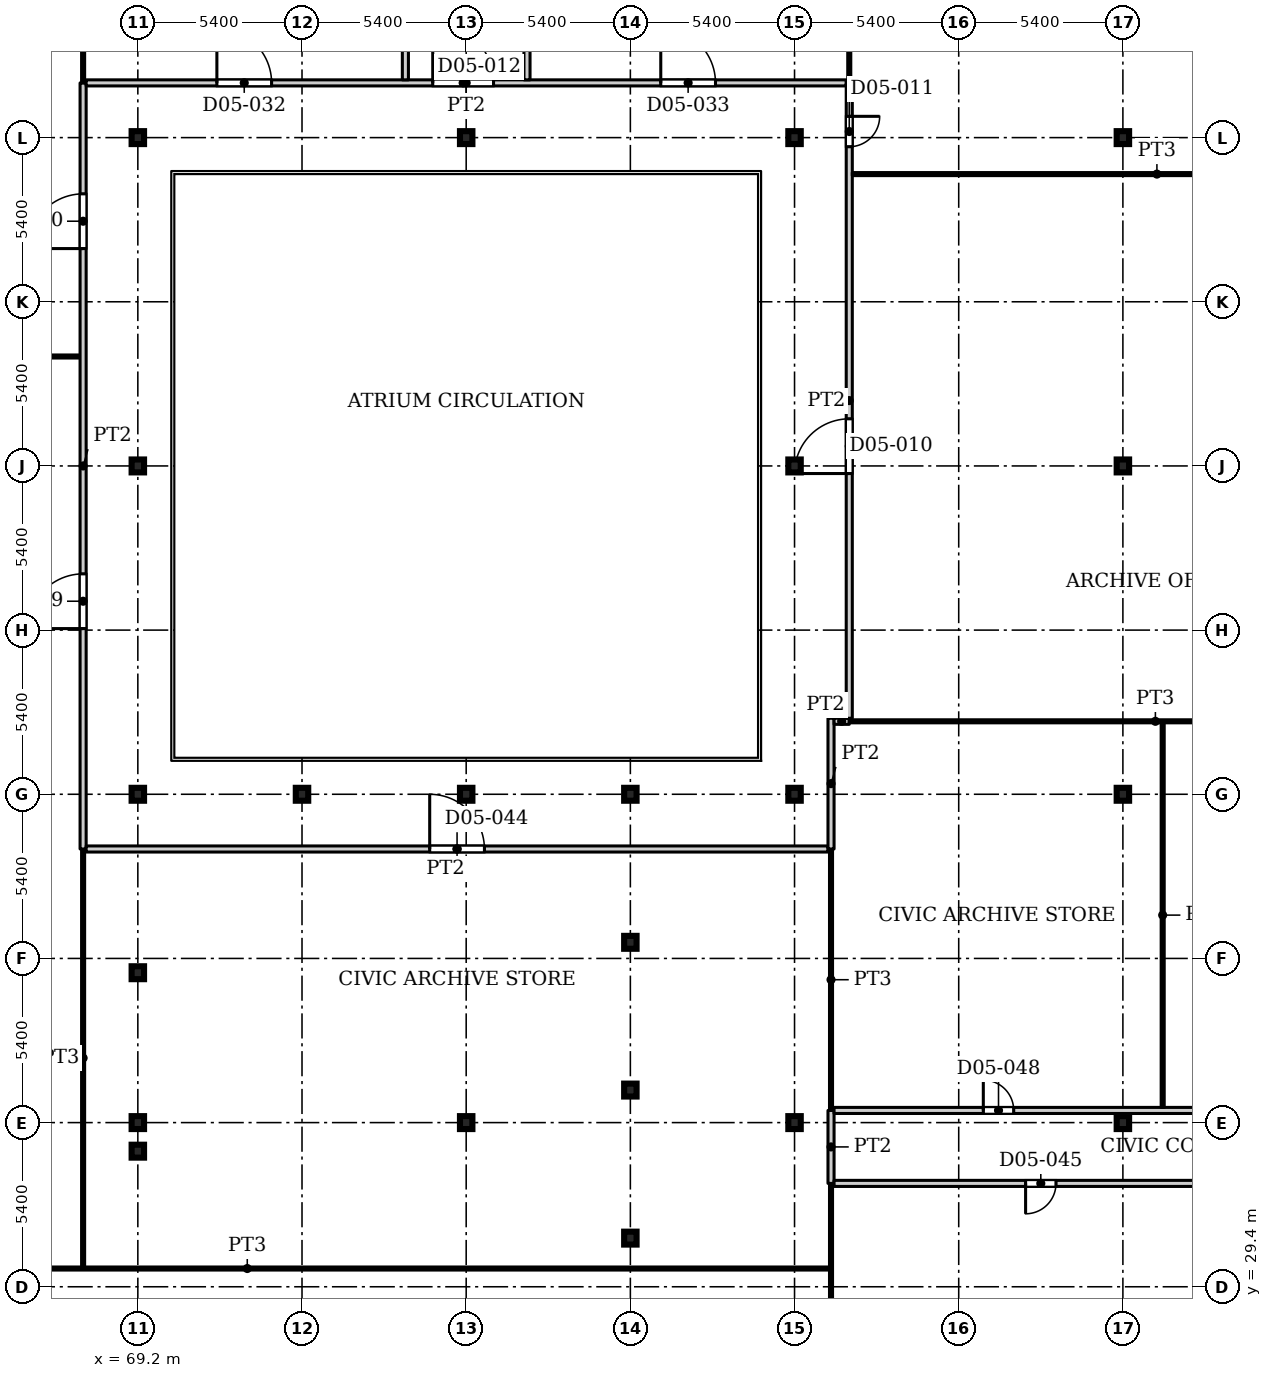
"""IFC4 building model, lengths in metres.
Left out: names, types, materials, properties, quantities, classifications, styles, units other than length and angle.
Written with IfcOpenShell. Run it as: python <this file> out.ifc"""

import sys

from ifc_helpers import new_model, si_unit, direction, frame, frame_2d, origin, origin_2d, place, context, subcontext, project, spatial, rectangle, i_section, extrude, source, transform, mapped, element, fill, save


model = new_model("IFC4")
c1 = context("Model", 3, precision=1e-05, world=origin(), true_north=direction((0.0, 1.0)))
c2 = subcontext(c1, "Body", "Model", "MODEL_VIEW")
j1 = project(units=[si_unit("LENGTHUNIT", "METRE"), si_unit("PLANEANGLEUNIT", "RADIAN")], contexts=[c1])
p1 = place(None, origin())
s1 = spatial("IfcSite", under=j1, at=p1, CompositionType="ELEMENT")
p2 = place(p1, origin())
s2 = spatial("IfcBuilding", under=s1, at=p2, CompositionType="ELEMENT")
p3 = place(p2, frame((0.0, 0.0, 26.0)))
s3 = spatial("IfcBuildingStorey", under=s2, at=p3, CompositionType="ELEMENT", Elevation=26.0)
for number, where, z_axis, x_axis in (
    (1, (69.2, 34.8, 0.0), (0.0, 0.0, 1.0), (1.0, 0.0, 0.0)),
    (2, (80.0, 34.8, 0.0), (0.0, 0.0, 1.0), (1.0, 0.0, 0.0)),
    (3, (90.8, 34.8, 0.0), (0.0, 0.0, 1.0), (1.0, 0.0, 0.0)),
    (4, (101.6, 34.8, 0.0), (0.0, 0.0, 1.0), (1.0, 0.0, 0.0)),
    (5, (69.2, 45.6, 0.0), (0.0, 0.0, 1.0), (1.0, 0.0, 0.0)),
    (6, (80.0, 45.6, 0.0), (0.0, 0.0, 1.0), (1.0, 0.0, 0.0)),
    (7, (90.8, 45.6, 0.0), (0.0, 0.0, 1.0), (1.0, 0.0, 0.0)),
    (8, (101.6, 45.6, 0.0), (0.0, 0.0, 1.0), (1.0, 0.0, 0.0)),
    (9, (69.2, 56.4, 0.0), (0.0, 0.0, 1.0), (1.0, 0.0, 0.0)),
    (10, (90.8, 56.4, 0.0), (0.0, 0.0, 1.0), (1.0, 0.0, 0.0)),
    (11, (101.6, 56.4, 0.0), (0.0, 0.0, 1.0), (1.0, 0.0, 0.0)),
    (12, (69.2, 67.2, 0.0), (0.0, 0.0, 1.0), (1.0, 0.0, 0.0)),
    (13, (80.0, 67.2, 0.0), (0.0, 0.0, 1.0), (1.0, 0.0, 0.0)),
    (14, (90.8, 67.2, 0.0), (0.0, 0.0, 1.0), (1.0, 0.0, 0.0)),
    (15, (101.6, 67.2, 0.0), (0.0, 0.0, 1.0), (1.0, 0.0, 0.0)),
    (16, (74.6, 45.6, 0.0), (0.0, 0.0, 1.0), (1.0, 0.0, 0.0)),
    (17, (85.4, 45.6, 0.0), (0.0, 0.0, 1.0), (1.0, 0.0, 0.0)),
    (18, (85.4, 31.0, 0.0), (0.0, 0.0, 1.0), (1.0, 0.0, 0.0)),
    (19, (69.2, 33.86, 0.0), (0.0, 0.0, 1.0), (1.0, 0.0, 0.0)),
    (20, (85.4, 35.87, 0.0), (0.0, 0.0, 1.0), (1.0, 0.0, 0.0)),
    (21, (69.2, 39.73, 0.0), (0.0, 0.0, 1.0), (1.0, 0.0, 0.0)),
    (22, (85.4, 40.73, 0.0), (0.0, 0.0, 1.0), (1.0, 0.0, 0.0)),
):
    element("IfcColumn", number, at=place(p3, frame(where, z_axis=z_axis, x_axis=x_axis)), inside=s3, PredefinedType="COLUMN", context=c2, shape_type="SweptSolid", body=[
        extrude(i_section(OverallWidth=0.409, OverallDepth=0.425, WebThickness=0.033, FlangeThickness=0.052, FilletRadius=0.013, at=origin_2d()), origin(), (0.0, 0.0, 1.0), 4.5),
    ])
p4 = place(p3, frame((33.45, 60.0, 0.0), z_axis=(0.0, 0.0, 1.0), x_axis=(1.0, 0.0, 0.0)))
e23 = element("IfcWall", 23, at=p4, inside=s3, PredefinedType="PARTITIONING", context=c2, shape_type="SweptSolid", body=[
    extrude(rectangle(XDim=33.85, YDim=0.1, at=frame_2d((16.925, 0.0))), origin(), (0.0, 0.0, 1.0), 4.2),
])
p5 = place(p3, frame((53.649, 30.0, 0.0), z_axis=(0.0, 0.0, 1.0), x_axis=(1.0, 0.0, 0.0)))
e24 = element("IfcWall", 24, at=p5, inside=s3, PredefinedType="PARTITIONING", context=c2, shape_type="SweptSolid", body=[
    extrude(rectangle(XDim=38.301, YDim=0.1, at=frame_2d((19.15, 0.0))), origin(), (0.0, 0.0, 1.0), 4.2),
])
p6 = place(p3, frame((67.4, 30.05, 0.0), z_axis=(0.0, 0.0, 1.0), x_axis=(0.0, 1.0, 0.0)))
e25 = element("IfcWall", 25, at=p6, inside=s3, PredefinedType="PARTITIONING", context=c2, shape_type="SweptSolid", body=[
    extrude(rectangle(XDim=13.75, YDim=0.1, at=frame_2d((6.875, 0.0))), origin(), (0.0, 0.0, 1.0), 4.2),
])
p7 = place(p3, frame((67.4, 43.8, 0.0), z_axis=(0.0, 0.0, 1.0), x_axis=(0.0, 1.0, 0.0)))
e26 = element("IfcWall", 26, at=p7, inside=s3, PredefinedType="PARTITIONING", context=c2, shape_type="SweptSolid", body=[
    extrude(rectangle(XDim=25.2, YDim=0.2, at=frame_2d((12.6, 0.0))), origin(), (0.0, 0.0, 1.0), 4.2),
])
p8 = place(p7, frame((7.25, 0.0, 0.0)))
e27 = element("IfcOpeningElement", 27, at=p8, cuts=e26, PredefinedType="OPENING", context=c2, shape_type="SweptSolid", body=[
    extrude(rectangle(XDim=1.8, YDim=2.1, at=frame_2d((0.9, 1.05))), frame((0.0, 0.11, 0.0), z_axis=(0.0, -1.0, 0.0), x_axis=(1.0, 0.0, 0.0)), (0.0, 0.0, 1.0), 0.22),
])
p9 = place(p7, frame((19.75, 0.0, 0.0)))
e28 = element("IfcOpeningElement", 28, at=p9, cuts=e26, PredefinedType="OPENING", context=c2, shape_type="SweptSolid", body=[
    extrude(rectangle(XDim=1.8, YDim=2.1, at=frame_2d((0.9, 1.05))), frame((0.0, 0.11, 0.0), z_axis=(0.0, -1.0, 0.0), x_axis=(1.0, 0.0, 0.0)), (0.0, 0.0, 1.0), 0.22),
])
p10 = place(p3, frame((67.4, 69.0, 0.0), z_axis=(0.0, 0.0, 1.0), x_axis=(0.0, 1.0, 0.0)))
e29 = element("IfcWall", 29, at=p10, inside=s3, PredefinedType="PARTITIONING", context=c2, shape_type="SweptSolid", body=[
    extrude(rectangle(XDim=21.738, YDim=0.1, at=frame_2d((10.869, 0.0))), origin(), (0.0, 0.0, 1.0), 4.2),
])
p11 = place(p3, frame((67.5, 43.8, 0.0), z_axis=(0.0, 0.0, 1.0), x_axis=(1.0, 0.0, 0.0)))
e30 = element("IfcWall", 30, at=p11, inside=s3, PredefinedType="PARTITIONING", context=c2, shape_type="SweptSolid", body=[
    extrude(rectangle(XDim=24.4, YDim=0.2, at=frame_2d((12.2, 0.0))), origin(), (0.0, 0.0, 1.0), 4.2),
])
p12 = place(p11, frame((11.3, 0.0, 0.0)))
e31 = element("IfcOpeningElement", 31, at=p12, cuts=e30, PredefinedType="OPENING", context=c2, shape_type="SweptSolid", body=[
    extrude(rectangle(XDim=1.8, YDim=2.1, at=frame_2d((0.9, 1.05))), frame((0.0, 0.11, 0.0), z_axis=(0.0, -1.0, 0.0), x_axis=(1.0, 0.0, 0.0)), (0.0, 0.0, 1.0), 0.22),
])
p13 = place(p3, frame((67.5, 69.0, 0.0), z_axis=(0.0, 0.0, 1.0), x_axis=(1.0, 0.0, 0.0)))
e32 = element("IfcWall", 32, at=p13, inside=s3, PredefinedType="PARTITIONING", context=c2, shape_type="SweptSolid", body=[
    extrude(rectangle(XDim=25.0, YDim=0.2, at=frame_2d((12.5, 0.0))), origin(), (0.0, 0.0, 1.0), 4.2),
])
p14 = place(p13, frame((11.4, 0.0, 0.0)))
e33 = element("IfcOpeningElement", 33, at=p14, cuts=e32, PredefinedType="OPENING", context=c2, shape_type="SweptSolid", body=[
    extrude(rectangle(XDim=2.0, YDim=2.1, at=frame_2d((1.0, 1.05))), frame((0.0, 0.11, 0.0), z_axis=(0.0, -1.0, 0.0), x_axis=(1.0, 0.0, 0.0)), (0.0, 0.0, 1.0), 0.22),
])
p15 = place(p13, frame((4.3, 0.0, 0.0)))
e34 = element("IfcOpeningElement", 34, at=p15, cuts=e32, PredefinedType="OPENING", context=c2, shape_type="SweptSolid", body=[
    extrude(rectangle(XDim=1.8, YDim=2.1, at=frame_2d((0.9, 1.05))), frame((0.0, 0.11, 0.0), z_axis=(0.0, -1.0, 0.0), x_axis=(1.0, 0.0, 0.0)), (0.0, 0.0, 1.0), 0.22),
])
p16 = place(p13, frame((18.9, 0.0, 0.0)))
e35 = element("IfcOpeningElement", 35, at=p16, cuts=e32, PredefinedType="OPENING", context=c2, shape_type="SweptSolid", body=[
    extrude(rectangle(XDim=1.8, YDim=2.1, at=frame_2d((0.9, 1.05))), frame((0.0, 0.11, 0.0), z_axis=(0.0, -1.0, 0.0), x_axis=(1.0, 0.0, 0.0)), (0.0, 0.0, 1.0), 0.22),
])
for number, where, z_axis, x_axis in (
    (36, (78.0, 69.1, 0.0), (0.0, 0.0, 1.0), (0.0, 1.0, 0.0)),
    (37, (82.0, 69.1, 0.0), (0.0, 0.0, 1.0), (0.0, 1.0, 0.0)),
):
    element("IfcWall", number, at=place(p3, frame(where, z_axis=z_axis, x_axis=x_axis)), inside=s3, PredefinedType="PARTITIONING", context=c2, shape_type="SweptSolid", body=[
        extrude(rectangle(XDim=21.6, YDim=0.2, at=frame_2d((10.8, 0.0))), origin(), (0.0, 0.0, 1.0), 4.2),
    ])
p17 = place(p3, frame((92.0, 22.05, 0.0), z_axis=(0.0, 0.0, 1.0), x_axis=(0.0, 1.0, 0.0)))
e38 = element("IfcWall", 38, at=p17, inside=s3, PredefinedType="PARTITIONING", context=c2, shape_type="SweptSolid", body=[
    extrude(rectangle(XDim=10.75, YDim=0.1, at=frame_2d((5.375, 0.0))), origin(), (0.0, 0.0, 1.0), 4.2),
])
p18 = place(p3, frame((92.0, 32.8, 0.0), z_axis=(0.0, 0.0, 1.0), x_axis=(0.0, 1.0, 0.0)))
e39 = element("IfcWall", 39, at=p18, inside=s3, PredefinedType="PARTITIONING", context=c2, shape_type="SweptSolid", body=[
    extrude(rectangle(XDim=2.4, YDim=0.2, at=frame_2d((1.2, 0.0))), origin(), (0.0, 0.0, 1.0), 4.2),
])
p19 = place(p3, frame((92.0, 35.2, 0.0), z_axis=(0.0, 0.0, 1.0), x_axis=(0.0, 1.0, 0.0)))
e40 = element("IfcWall", 40, at=p19, inside=s3, PredefinedType="PARTITIONING", context=c2, shape_type="SweptSolid", body=[
    extrude(rectangle(XDim=8.6, YDim=0.1, at=frame_2d((4.3, 0.0))), origin(), (0.0, 0.0, 1.0), 4.2),
])
p20 = place(p3, frame((92.0, 43.8, 0.0), z_axis=(0.0, 0.0, 1.0), x_axis=(0.0, 1.0, 0.0)))
e41 = element("IfcWall", 41, at=p20, inside=s3, PredefinedType="PARTITIONING", context=c2, shape_type="SweptSolid", body=[
    extrude(rectangle(XDim=4.3, YDim=0.2, at=frame_2d((2.15, 0.0))), origin(), (0.0, 0.0, 1.0), 4.2),
])
p21 = place(p3, frame((92.1, 32.8, 0.0), z_axis=(0.0, 0.0, 1.0), x_axis=(1.0, 0.0, 0.0)))
e42 = element("IfcWall", 42, at=p21, inside=s3, PredefinedType="PARTITIONING", context=c2, shape_type="SweptSolid", body=[
    extrude(rectangle(XDim=32.881, YDim=0.2, at=frame_2d((16.44, 0.0))), origin(), (0.0, 0.0, 1.0), 4.2),
])
p22 = place(p21, frame((6.3, 0.0, 0.0)))
e43 = element("IfcOpeningElement", 43, at=p22, cuts=e42, PredefinedType="OPENING", context=c2, shape_type="SweptSolid", body=[
    extrude(rectangle(XDim=1.0, YDim=2.1, at=frame_2d((0.5, 1.05))), frame((0.0, 0.11, 0.0), z_axis=(0.0, -1.0, 0.0), x_axis=(1.0, 0.0, 0.0)), (0.0, 0.0, 1.0), 0.22),
])
p23 = place(p21, frame((19.3, 0.0, 0.0)))
e44 = element("IfcOpeningElement", 44, at=p23, cuts=e42, PredefinedType="OPENING", context=c2, shape_type="SweptSolid", body=[
    extrude(rectangle(XDim=1.0, YDim=2.1, at=frame_2d((0.5, 1.05))), frame((0.0, 0.11, 0.0), z_axis=(0.0, -1.0, 0.0), x_axis=(1.0, 0.0, 0.0)), (0.0, 0.0, 1.0), 0.22),
])
p24 = place(p21, frame((29.05, 0.0, 0.0)))
e45 = element("IfcOpeningElement", 45, at=p24, cuts=e42, PredefinedType="OPENING", context=c2, shape_type="SweptSolid", body=[
    extrude(rectangle(XDim=1.0, YDim=2.1, at=frame_2d((0.5, 1.05))), frame((0.0, 0.11, 0.0), z_axis=(0.0, -1.0, 0.0), x_axis=(1.0, 0.0, 0.0)), (0.0, 0.0, 1.0), 0.22),
])
p25 = place(p3, frame((92.1, 35.2, 0.0), z_axis=(0.0, 0.0, 1.0), x_axis=(1.0, 0.0, 0.0)))
e46 = element("IfcWall", 46, at=p25, inside=s3, PredefinedType="PARTITIONING", context=c2, shape_type="SweptSolid", body=[
    extrude(rectangle(XDim=32.88, YDim=0.2, at=frame_2d((16.44, 0.0))), origin(), (0.0, 0.0, 1.0), 4.2),
])
p26 = place(p25, frame((4.909, 0.0, 0.0)))
e47 = element("IfcOpeningElement", 47, at=p26, cuts=e46, PredefinedType="OPENING", context=c2, shape_type="SweptSolid", body=[
    extrude(rectangle(XDim=1.0, YDim=2.1, at=frame_2d((0.5, 1.05))), frame((0.0, 0.11, 0.0), z_axis=(0.0, -1.0, 0.0), x_axis=(1.0, 0.0, 0.0)), (0.0, 0.0, 1.0), 0.22),
])
p27 = place(p25, frame((13.932, 0.0, 0.0)))
e48 = element("IfcOpeningElement", 48, at=p27, cuts=e46, PredefinedType="OPENING", context=c2, shape_type="SweptSolid", body=[
    extrude(rectangle(XDim=1.0, YDim=2.1, at=frame_2d((0.5, 1.05))), frame((0.0, 0.11, 0.0), z_axis=(0.0, -1.0, 0.0), x_axis=(1.0, 0.0, 0.0)), (0.0, 0.0, 1.0), 0.22),
])
p28 = place(p25, frame((23.091, 0.0, 0.0)))
e49 = element("IfcOpeningElement", 49, at=p28, cuts=e46, PredefinedType="OPENING", context=c2, shape_type="SweptSolid", body=[
    extrude(rectangle(XDim=1.0, YDim=2.1, at=frame_2d((0.5, 1.05))), frame((0.0, 0.11, 0.0), z_axis=(0.0, -1.0, 0.0), x_axis=(1.0, 0.0, 0.0)), (0.0, 0.0, 1.0), 0.22),
])
p29 = place(p25, frame((29.477, 0.0, 0.0)))
e50 = element("IfcOpeningElement", 50, at=p29, cuts=e46, PredefinedType="OPENING", context=c2, shape_type="SweptSolid", body=[
    extrude(rectangle(XDim=1.0, YDim=2.1, at=frame_2d((0.5, 1.05))), frame((0.0, 0.11, 0.0), z_axis=(0.0, -1.0, 0.0), x_axis=(1.0, 0.0, 0.0)), (0.0, 0.0, 1.0), 0.22),
])
p30 = place(p3, frame((92.1, 48.0, 0.0), z_axis=(0.0, 0.0, 1.0), x_axis=(1.0, 0.0, 0.0)))
e51 = element("IfcWall", 51, at=p30, inside=s3, PredefinedType="PARTITIONING", context=c2, shape_type="SweptSolid", body=[
    extrude(rectangle(XDim=0.5, YDim=0.2, at=frame_2d((0.25, 0.0))), origin(), (0.0, 0.0, 1.0), 4.2),
])
p31 = place(p3, frame((92.6, 48.0, 0.0), z_axis=(0.0, 0.0, 1.0), x_axis=(1.0, 0.0, 0.0)))
e52 = element("IfcWall", 52, at=p31, inside=s3, PredefinedType="PARTITIONING", context=c2, shape_type="SweptSolid", body=[
    extrude(rectangle(XDim=20.138, YDim=0.1, at=frame_2d((10.069, 0.0))), origin(), (0.0, 0.0, 1.0), 4.2),
])
p32 = place(p3, frame((92.6, 48.1, 0.0), z_axis=(0.0, 0.0, 1.0), x_axis=(0.0, 1.0, 0.0)))
e53 = element("IfcWall", 53, at=p32, inside=s3, PredefinedType="PARTITIONING", context=c2, shape_type="SweptSolid", body=[
    extrude(rectangle(XDim=20.9, YDim=0.2, at=frame_2d((10.45, 0.0))), origin(), (0.0, 0.0, 1.0), 4.2),
])
p33 = place(p32, frame((8.05, 0.0, 0.0)))
e54 = element("IfcOpeningElement", 54, at=p33, cuts=e53, PredefinedType="OPENING", context=c2, shape_type="SweptSolid", body=[
    extrude(rectangle(XDim=1.8, YDim=2.1, at=frame_2d((0.9, 1.05))), frame((0.0, 0.11, 0.0), z_axis=(0.0, -1.0, 0.0), x_axis=(1.0, 0.0, 0.0)), (0.0, 0.0, 1.0), 0.22),
])
p34 = place(p32, frame((18.8, 0.0, 0.0)))
e55 = element("IfcOpeningElement", 55, at=p34, cuts=e53, PredefinedType="OPENING", context=c2, shape_type="SweptSolid", body=[
    extrude(rectangle(XDim=1.0, YDim=2.1, at=frame_2d((0.5, 1.05))), frame((0.0, 0.11, 0.0), z_axis=(0.0, -1.0, 0.0), x_axis=(1.0, 0.0, 0.0)), (0.0, 0.0, 1.0), 0.22),
])
p35 = place(p3, frame((92.6, 69.0, 0.0), z_axis=(0.0, 0.0, 1.0), x_axis=(0.0, 1.0, 0.0)))
e56 = element("IfcWall", 56, at=p35, inside=s3, PredefinedType="PARTITIONING", context=c2, shape_type="SweptSolid", body=[
    extrude(rectangle(XDim=21.738, YDim=0.1, at=frame_2d((10.869, 0.0))), origin(), (0.0, 0.0, 1.0), 4.2),
])
p36 = place(p3, frame((92.7, 66.0, 0.0), z_axis=(0.0, 0.0, 1.0), x_axis=(1.0, 0.0, 0.0)))
e57 = element("IfcWall", 57, at=p36, inside=s3, PredefinedType="PARTITIONING", context=c2, shape_type="SweptSolid", body=[
    extrude(rectangle(XDim=20.038, YDim=0.1, at=frame_2d((10.019, 0.0))), origin(), (0.0, 0.0, 1.0), 4.2),
])
p37 = place(p3, frame((102.909, 35.3, 0.0), z_axis=(0.0, 0.0, 1.0), x_axis=(0.0, 1.0, 0.0)))
e58 = element("IfcWall", 58, at=p37, inside=s3, PredefinedType="PARTITIONING", context=c2, shape_type="SweptSolid", body=[
    extrude(rectangle(XDim=12.65, YDim=0.1, at=frame_2d((6.325, 0.0))), origin(), (0.0, 0.0, 1.0), 4.2),
])
m1 = source(origin(), c2, "Body", "SweptSolid", [
    extrude(rectangle(XDim=1.8, YDim=2.1, at=frame_2d((0.9, 1.05))), frame((0.0, 0.025, 0.0), z_axis=(0.0, -1.0, 0.0), x_axis=(1.0, 0.0, 0.0)), (0.0, 0.0, 1.0), 0.05),
])
p38 = place(p33, origin())
e59 = element("IfcDoor", 59, at=p38, inside=s3, OperationType="DOUBLE_DOOR_SINGLE_SWING", PredefinedType="DOOR", context=c2, shape_type="MappedRepresentation", body=[
    mapped(m1, transform((0.0, 0.0, 0.0), x_axis=(1.0, 0.0, 0.0), y_axis=(0.0, 1.0, 0.0), z_axis=(0.0, 0.0, 1.0), scale=1.0)),
])
fill(e54, e59)
m2 = source(origin(), c2, "Body", "SweptSolid", [
    extrude(rectangle(XDim=1.0, YDim=2.1, at=frame_2d((0.5, 1.05))), frame((0.0, 0.025, 0.0), z_axis=(0.0, -1.0, 0.0), x_axis=(1.0, 0.0, 0.0)), (0.0, 0.0, 1.0), 0.05),
])
p39 = place(p34, origin())
e60 = element("IfcDoor", 60, at=p39, inside=s3, OperationType="SINGLE_SWING_RIGHT", PredefinedType="DOOR", context=c2, shape_type="MappedRepresentation", body=[
    mapped(m2, transform((0.0, 0.0, 0.0), x_axis=(1.0, 0.0, 0.0), y_axis=(0.0, 1.0, 0.0), z_axis=(0.0, 0.0, 1.0), scale=1.0)),
])
fill(e55, e60)
m3 = source(origin(), c2, "Body", "SweptSolid", [
    extrude(rectangle(XDim=2.0, YDim=2.1, at=frame_2d((1.0, 1.05))), frame((0.0, 0.025, 0.0), z_axis=(0.0, -1.0, 0.0), x_axis=(1.0, 0.0, 0.0)), (0.0, 0.0, 1.0), 0.05),
])
p40 = place(p14, origin())
e61 = element("IfcDoor", 61, at=p40, inside=s3, OperationType="DOUBLE_DOOR_SINGLE_SWING", PredefinedType="DOOR", context=c2, shape_type="MappedRepresentation", body=[
    mapped(m3, transform((0.0, 0.0, 0.0), x_axis=(1.0, 0.0, 0.0), y_axis=(0.0, 1.0, 0.0), z_axis=(0.0, 0.0, 1.0), scale=1.0)),
])
fill(e33, e61)
p41 = place(p15, origin())
e62 = element("IfcDoor", 62, at=p41, inside=s3, OperationType="DOUBLE_DOOR_SINGLE_SWING", PredefinedType="DOOR", context=c2, shape_type="MappedRepresentation", body=[
    mapped(m1, transform((0.0, 0.0, 0.0), x_axis=(1.0, 0.0, 0.0), y_axis=(0.0, 1.0, 0.0), z_axis=(0.0, 0.0, 1.0), scale=1.0)),
])
fill(e34, e62)
p42 = place(p16, origin())
e63 = element("IfcDoor", 63, at=p42, inside=s3, OperationType="DOUBLE_DOOR_SINGLE_SWING", PredefinedType="DOOR", context=c2, shape_type="MappedRepresentation", body=[
    mapped(m1, transform((0.0, 0.0, 0.0), x_axis=(1.0, 0.0, 0.0), y_axis=(0.0, 1.0, 0.0), z_axis=(0.0, 0.0, 1.0), scale=1.0)),
])
fill(e35, e63)
p43 = place(p12, origin())
e64 = element("IfcDoor", 64, at=p43, inside=s3, OperationType="DOUBLE_DOOR_SINGLE_SWING", PredefinedType="DOOR", context=c2, shape_type="MappedRepresentation", body=[
    mapped(m1, transform((0.0, 0.0, 0.0), x_axis=(1.0, 0.0, 0.0), y_axis=(0.0, 1.0, 0.0), z_axis=(0.0, 0.0, 1.0), scale=1.0)),
])
fill(e31, e64)
p44 = place(p22, origin())
e65 = element("IfcDoor", 65, at=p44, inside=s3, OperationType="SINGLE_SWING_RIGHT", PredefinedType="DOOR", context=c2, shape_type="MappedRepresentation", body=[
    mapped(m2, transform((0.0, 0.0, 0.0), x_axis=(1.0, 0.0, 0.0), y_axis=(0.0, 1.0, 0.0), z_axis=(0.0, 0.0, 1.0), scale=1.0)),
])
fill(e43, e65)
p45 = place(p26, origin())
e66 = element("IfcDoor", 66, at=p45, inside=s3, OperationType="SINGLE_SWING_LEFT", PredefinedType="DOOR", context=c2, shape_type="MappedRepresentation", body=[
    mapped(m2, transform((0.0, 0.0, 0.0), x_axis=(1.0, 0.0, 0.0), y_axis=(0.0, 1.0, 0.0), z_axis=(0.0, 0.0, 1.0), scale=1.0)),
])
fill(e47, e66)
p46 = place(p8, origin())
e67 = element("IfcDoor", 67, at=p46, inside=s3, OperationType="DOUBLE_DOOR_SINGLE_SWING", PredefinedType="DOOR", context=c2, shape_type="MappedRepresentation", body=[
    mapped(m1, transform((0.0, 0.0, 0.0), x_axis=(1.0, 0.0, 0.0), y_axis=(0.0, 1.0, 0.0), z_axis=(0.0, 0.0, 1.0), scale=1.0)),
])
fill(e27, e67)
p47 = place(p9, origin())
e68 = element("IfcDoor", 68, at=p47, inside=s3, OperationType="DOUBLE_DOOR_SINGLE_SWING", PredefinedType="DOOR", context=c2, shape_type="MappedRepresentation", body=[
    mapped(m1, transform((0.0, 0.0, 0.0), x_axis=(1.0, 0.0, 0.0), y_axis=(0.0, 1.0, 0.0), z_axis=(0.0, 0.0, 1.0), scale=1.0)),
])
fill(e28, e68)
save(model, sys.argv[1])
